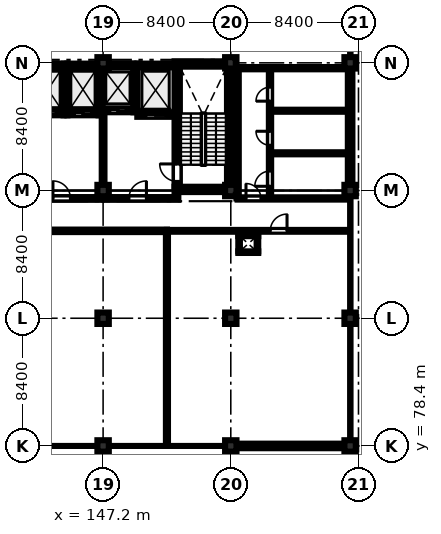
"""IFC4 building model, lengths in metres.
Left out: names, types, materials, properties, quantities, classifications, styles, units other than length and angle.
Written with IfcOpenShell. Run it as: python <this file> out.ifc"""

import sys

from ifc_helpers import new_model, si_unit, direction, frame, frame_2d, origin, origin_2d, place, context, subcontext, project, spatial, rectangle, extrude, element, fill, save


model = new_model("IFC4")
c1 = context("Model", 3, precision=1e-05, world=origin(), true_north=direction((0.0, 1.0)))
c2 = subcontext(c1, "Body", "Model", "MODEL_VIEW")
j1 = project(units=[si_unit("LENGTHUNIT", "METRE"), si_unit("PLANEANGLEUNIT", "RADIAN")], contexts=[c1])
p1 = place(None, origin())
s1 = spatial("IfcSite", under=j1, at=p1, CompositionType="ELEMENT")
p2 = place(p1, origin())
s2 = spatial("IfcBuilding", under=s1, at=p2, CompositionType="ELEMENT")
p3 = place(p2, frame((0.0, 0.0, 40.2)))
s3 = spatial("IfcBuildingStorey", under=s2, at=p3, CompositionType="ELEMENT", Elevation=40.2)
for number, where, z_axis, x_axis in (
    (1, (147.2, 78.4, 0.0), (0.0, 0.0, 1.0), (1.0, 0.0, 0.0)),
    (2, (147.2, 86.8, 0.0), (0.0, 0.0, 1.0), (1.0, 0.0, 0.0)),
    (3, (147.2, 95.2, 0.0), (0.0, 0.0, 1.0), (1.0, 0.0, 0.0)),
    (4, (147.2, 103.6, 0.0), (0.0, 0.0, 1.0), (1.0, 0.0, 0.0)),
    (5, (155.6, 78.4, 0.0), (0.0, 0.0, 1.0), (1.0, 0.0, 0.0)),
    (6, (155.6, 86.8, 0.0), (0.0, 0.0, 1.0), (1.0, 0.0, 0.0)),
    (7, (155.6, 95.2, 0.0), (0.0, 0.0, 1.0), (1.0, 0.0, 0.0)),
    (8, (155.6, 103.6, 0.0), (0.0, 0.0, 1.0), (1.0, 0.0, 0.0)),
    (9, (163.45, 78.4, 0.0), (0.0, 0.0, 1.0), (1.0, 0.0, 0.0)),
    (10, (163.45, 86.8, 0.0), (0.0, 0.0, 1.0), (1.0, 0.0, 0.0)),
    (11, (163.45, 95.2, 0.0), (0.0, 0.0, 1.0), (1.0, 0.0, 0.0)),
    (12, (163.45, 103.6, 0.0), (0.0, 0.0, 1.0), (1.0, 0.0, 0.0)),
):
    element("IfcColumn", number, at=place(p3, frame(where, z_axis=z_axis, x_axis=x_axis)), inside=s3, PredefinedType="COLUMN", context=c2, shape_type="SweptSolid", body=[
        extrude(rectangle(XDim=0.75, YDim=0.75, at=origin_2d()), origin(), (0.0, 0.0, 1.0), 4.0),
    ])
for number, where, z_axis, x_axis in (
    (13, (151.9, 95.275, 0.0), (0.0, 0.0, 1.0), (1.0, 0.0, 0.0)),
    (14, (151.9, 103.525, 0.0), (0.0, 0.0, 1.0), (1.0, 0.0, 0.0)),
):
    element("IfcWall", number, at=place(p3, frame(where, z_axis=z_axis, x_axis=x_axis)), inside=s3, PredefinedType="SHEAR", context=c2, shape_type="SweptSolid", body=[
        extrude(rectangle(XDim=3.8, YDim=0.35, at=frame_2d((1.9, 0.0))), origin(), (0.0, 0.0, 1.0), 4.0),
    ])
p4 = place(p3, frame((152.075, 95.45, 0.0), z_axis=(0.0, 0.0, 1.0), x_axis=(0.0, 1.0, 0.0)))
e15 = element("IfcWall", 15, at=p4, inside=s3, PredefinedType="SHEAR", context=c2, shape_type="SweptSolid", body=[
    extrude(rectangle(XDim=7.9, YDim=0.35, at=frame_2d((3.95, 0.0))), origin(), (0.0, 0.0, 1.0), 4.0),
])
p5 = place(p4, frame((0.35, 0.0, 0.0)))
e16 = element("IfcOpeningElement", 16, at=p5, cuts=e15, PredefinedType="OPENING", context=c2, shape_type="SweptSolid", body=[
    extrude(rectangle(XDim=1.15, YDim=2.15, at=frame_2d((0.575, 1.075))), frame((0.0, 0.185, 0.0), z_axis=(0.0, -1.0, 0.0), x_axis=(1.0, 0.0, 0.0)), (0.0, 0.0, 1.0), 0.37),
])
p6 = place(p3, frame((155.525, 95.45, 0.0), z_axis=(0.0, 0.0, 1.0), x_axis=(0.0, 1.0, 0.0)))
e17 = element("IfcWall", 17, at=p6, inside=s3, PredefinedType="SHEAR", context=c2, shape_type="SweptSolid", body=[
    extrude(rectangle(XDim=7.9, YDim=0.35, at=frame_2d((3.95, 0.0))), origin(), (0.0, 0.0, 1.0), 4.0),
])
p7 = place(p3, frame((142.5, 100.275, 0.0), z_axis=(0.0, 0.0, 1.0), x_axis=(1.0, 0.0, 0.0)))
e18 = element("IfcWall", 18, at=p7, inside=s3, PredefinedType="SHEAR", context=c2, shape_type="SweptSolid", body=[
    extrude(rectangle(XDim=2.1, YDim=0.25, at=frame_2d((1.05, 0.0))), origin(), (0.0, 0.0, 1.0), 4.0),
])
p8 = place(p7, frame((0.5, 0.0, 0.0)))
e19 = element("IfcOpeningElement", 19, at=p8, cuts=e18, PredefinedType="OPENING", context=c2, shape_type="SweptSolid", body=[
    extrude(rectangle(XDim=1.1, YDim=2.15, at=frame_2d((0.55, 1.075))), frame((0.0, 0.135, 0.0), z_axis=(0.0, -1.0, 0.0), x_axis=(1.0, 0.0, 0.0)), (0.0, 0.0, 1.0), 0.27),
])
p9 = place(p3, frame((142.5, 103.425, 0.0), z_axis=(0.0, 0.0, 1.0), x_axis=(1.0, 0.0, 0.0)))
e20 = element("IfcWall", 20, at=p9, inside=s3, PredefinedType="SHEAR", context=c2, shape_type="SweptSolid", body=[
    extrude(rectangle(XDim=2.1, YDim=0.25, at=frame_2d((1.05, 0.0))), origin(), (0.0, 0.0, 1.0), 4.0),
])
p10 = place(p3, frame((144.725, 100.15, 0.0), z_axis=(0.0, 0.0, 1.0), x_axis=(0.0, 1.0, 0.0)))
e21 = element("IfcWall", 21, at=p10, inside=s3, PredefinedType="SHEAR", context=c2, shape_type="SweptSolid", body=[
    extrude(rectangle(XDim=3.4, YDim=0.25, at=frame_2d((1.7, 0.0))), origin(), (0.0, 0.0, 1.0), 4.0),
])
p11 = place(p3, frame((144.85, 100.275, 0.0), z_axis=(0.0, 0.0, 1.0), x_axis=(1.0, 0.0, 0.0)))
e22 = element("IfcWall", 22, at=p11, inside=s3, PredefinedType="SHEAR", context=c2, shape_type="SweptSolid", body=[
    extrude(rectangle(XDim=2.05, YDim=0.25, at=frame_2d((1.025, 0.0))), origin(), (0.0, 0.0, 1.0), 4.0),
])
p12 = place(p11, frame((0.465, 0.0, 0.0)))
e23 = element("IfcOpeningElement", 23, at=p12, cuts=e22, PredefinedType="OPENING", context=c2, shape_type="SweptSolid", body=[
    extrude(rectangle(XDim=1.12, YDim=2.15, at=frame_2d((0.56, 1.075))), frame((0.0, 0.135, 0.0), z_axis=(0.0, -1.0, 0.0), x_axis=(1.0, 0.0, 0.0)), (0.0, 0.0, 1.0), 0.27),
])
p13 = place(p3, frame((144.85, 103.425, 0.0), z_axis=(0.0, 0.0, 1.0), x_axis=(1.0, 0.0, 0.0)))
e24 = element("IfcWall", 24, at=p13, inside=s3, PredefinedType="SHEAR", context=c2, shape_type="SweptSolid", body=[
    extrude(rectangle(XDim=2.05, YDim=0.25, at=frame_2d((1.025, 0.0))), origin(), (0.0, 0.0, 1.0), 4.0),
])
p14 = place(p3, frame((147.025, 100.15, 0.0), z_axis=(0.0, 0.0, 1.0), x_axis=(0.0, 1.0, 0.0)))
e25 = element("IfcWall", 25, at=p14, inside=s3, PredefinedType="SHEAR", context=c2, shape_type="SweptSolid", body=[
    extrude(rectangle(XDim=3.4, YDim=0.25, at=frame_2d((1.7, 0.0))), origin(), (0.0, 0.0, 1.0), 4.0),
])
p15 = place(p3, frame((147.15, 100.475, 0.0), z_axis=(0.0, 0.0, 1.0), x_axis=(1.0, 0.0, 0.0)))
e26 = element("IfcWall", 26, at=p15, inside=s3, PredefinedType="SHEAR", context=c2, shape_type="SweptSolid", body=[
    extrude(rectangle(XDim=2.05, YDim=0.25, at=frame_2d((1.025, 0.0))), origin(), (0.0, 0.0, 1.0), 4.0),
])
p16 = place(p15, frame((0.495, 0.0, 0.0)))
e27 = element("IfcOpeningElement", 27, at=p16, cuts=e26, PredefinedType="OPENING", context=c2, shape_type="SweptSolid", body=[
    extrude(rectangle(XDim=1.06, YDim=2.15, at=frame_2d((0.53, 1.075))), frame((0.0, 0.135, 0.0), z_axis=(0.0, -1.0, 0.0), x_axis=(1.0, 0.0, 0.0)), (0.0, 0.0, 1.0), 0.27),
])
p17 = place(p3, frame((147.15, 103.425, 0.0), z_axis=(0.0, 0.0, 1.0), x_axis=(1.0, 0.0, 0.0)))
e28 = element("IfcWall", 28, at=p17, inside=s3, PredefinedType="SHEAR", context=c2, shape_type="SweptSolid", body=[
    extrude(rectangle(XDim=2.05, YDim=0.25, at=frame_2d((1.025, 0.0))), origin(), (0.0, 0.0, 1.0), 4.0),
])
p18 = place(p3, frame((149.325, 100.35, 0.0), z_axis=(0.0, 0.0, 1.0), x_axis=(0.0, 1.0, 0.0)))
e29 = element("IfcWall", 29, at=p18, inside=s3, PredefinedType="SHEAR", context=c2, shape_type="SweptSolid", body=[
    extrude(rectangle(XDim=3.2, YDim=0.25, at=frame_2d((1.6, 0.0))), origin(), (0.0, 0.0, 1.0), 4.0),
])
p19 = place(p3, frame((149.45, 100.175, 0.0), z_axis=(0.0, 0.0, 1.0), x_axis=(1.0, 0.0, 0.0)))
e30 = element("IfcWall", 30, at=p19, inside=s3, PredefinedType="SHEAR", context=c2, shape_type="SweptSolid", body=[
    extrude(rectangle(XDim=2.45, YDim=0.25, at=frame_2d((1.225, 0.0))), origin(), (0.0, 0.0, 1.0), 4.0),
])
p20 = place(p19, frame((0.575, 0.0, 0.0)))
e31 = element("IfcOpeningElement", 31, at=p20, cuts=e30, PredefinedType="OPENING", context=c2, shape_type="SweptSolid", body=[
    extrude(rectangle(XDim=1.3, YDim=2.25, at=frame_2d((0.65, 1.125))), frame((0.0, 0.135, 0.0), z_axis=(0.0, -1.0, 0.0), x_axis=(1.0, 0.0, 0.0)), (0.0, 0.0, 1.0), 0.27),
])
p21 = place(p3, frame((149.45, 103.425, 0.0), z_axis=(0.0, 0.0, 1.0), x_axis=(1.0, 0.0, 0.0)))
e32 = element("IfcWall", 32, at=p21, inside=s3, PredefinedType="SHEAR", context=c2, shape_type="SweptSolid", body=[
    extrude(rectangle(XDim=2.45, YDim=0.25, at=frame_2d((1.225, 0.0))), origin(), (0.0, 0.0, 1.0), 4.0),
])
p22 = place(p3, frame((163.075, 78.4, 0.0), z_axis=(0.0, 0.0, 1.0), x_axis=(-1.0, 0.0, 0.0)))
e33 = element("IfcWall", 33, at=p22, inside=s3, PredefinedType="STANDARD", context=c2, shape_type="SweptSolid", body=[
    extrude(rectangle(XDim=7.1, YDim=0.3, at=frame_2d((3.55, 0.0))), origin(), (0.0, 0.0, 1.0), 3.3),
])
p23 = place(p22, frame((1.15, 0.0, 0.95)))
e34 = element("IfcOpeningElement", 34, at=p23, cuts=e33, PredefinedType="OPENING", context=c2, shape_type="SweptSolid", body=[
    extrude(rectangle(XDim=2.25, YDim=1.95, at=frame_2d((1.125, 0.975))), frame((0.0, 0.16, 0.0), z_axis=(0.0, -1.0, 0.0), x_axis=(1.0, 0.0, 0.0)), (0.0, 0.0, 1.0), 0.32),
])
p24 = place(p3, frame((163.45, 103.225, 0.0), z_axis=(0.0, 0.0, 1.0), x_axis=(0.0, -1.0, 0.0)))
e35 = element("IfcWall", 35, at=p24, inside=s3, PredefinedType="STANDARD", context=c2, shape_type="SweptSolid", body=[
    extrude(rectangle(XDim=7.65, YDim=0.3, at=frame_2d((3.825, 0.0))), origin(), (0.0, 0.0, 1.0), 3.3),
])
p25 = place(p24, frame((1.15, 0.0, 1.1)))
e36 = element("IfcOpeningElement", 36, at=p25, cuts=e35, PredefinedType="OPENING", context=c2, shape_type="SweptSolid", body=[
    extrude(rectangle(XDim=1.4, YDim=1.4, at=frame_2d((0.7, 0.7))), frame((0.0, 0.16, 0.0), z_axis=(0.0, -1.0, 0.0), x_axis=(1.0, 0.0, 0.0)), (0.0, 0.0, 1.0), 0.32),
])
p26 = place(p3, frame((142.3, 94.68, 0.0), z_axis=(0.0, 0.0, 1.0), x_axis=(1.0, 0.0, 0.0)))
e37 = element("IfcWall", 37, at=p26, inside=s3, PredefinedType="STANDARD", context=c2, shape_type="SweptSolid", body=[
    extrude(rectangle(XDim=4.8, YDim=0.18, at=frame_2d((2.4, 0.0))), origin(), (0.0, 0.0, 1.0), 4.0),
])
p27 = place(p26, frame((1.6, 0.0, 0.0)))
e38 = element("IfcOpeningElement", 38, at=p27, cuts=e37, PredefinedType="OPENING", context=c2, shape_type="SweptSolid", body=[
    extrude(rectangle(XDim=1.15, YDim=2.15, at=frame_2d((0.575, 1.075))), frame((0.0, 0.1, 0.0), z_axis=(0.0, -1.0, 0.0), x_axis=(1.0, 0.0, 0.0)), (0.0, 0.0, 1.0), 0.2),
])
p28 = place(p3, frame((147.3, 94.68, 0.0), z_axis=(0.0, 0.0, 1.0), x_axis=(1.0, 0.0, 0.0)))
e39 = element("IfcWall", 39, at=p28, inside=s3, PredefinedType="STANDARD", context=c2, shape_type="SweptSolid", body=[
    extrude(rectangle(XDim=4.85, YDim=0.18, at=frame_2d((2.425, 0.0))), origin(), (0.0, 0.0, 1.0), 4.0),
])
p29 = place(p28, frame((1.6, 0.0, 0.0)))
e40 = element("IfcOpeningElement", 40, at=p29, cuts=e39, PredefinedType="OPENING", context=c2, shape_type="SweptSolid", body=[
    extrude(rectangle(XDim=1.15, YDim=2.15, at=frame_2d((0.575, 1.075))), frame((0.0, 0.1, 0.0), z_axis=(0.0, -1.0, 0.0), x_axis=(1.0, 0.0, 0.0)), (0.0, 0.0, 1.0), 0.2),
])
p30 = place(p3, frame((147.2, 95.75, 0.0), z_axis=(0.0, 0.0, 1.0), x_axis=(0.0, 1.0, 0.0)))
e41 = element("IfcWall", 41, at=p30, inside=s3, PredefinedType="STANDARD", context=c2, shape_type="SweptSolid", body=[
    extrude(rectangle(XDim=4.5, YDim=0.18, at=frame_2d((2.25, 0.0))), origin(), (0.0, 0.0, 1.0), 3.3),
])
p31 = place(p3, frame((156.05, 94.68, 0.0), z_axis=(0.0, 0.0, 1.0), x_axis=(1.0, 0.0, 0.0)))
e42 = element("IfcWall", 42, at=p31, inside=s3, PredefinedType="PARTITIONING", context=c2, shape_type="SweptSolid", body=[
    extrude(rectangle(XDim=7.15, YDim=0.15, at=frame_2d((3.575, 0.0))), origin(), (0.0, 0.0, 1.0), 4.0),
])
p32 = place(p31, frame((0.55, 0.0, 0.0)))
e43 = element("IfcOpeningElement", 43, at=p32, cuts=e42, PredefinedType="OPENING", context=c2, shape_type="SweptSolid", body=[
    extrude(rectangle(XDim=0.98, YDim=2.12, at=frame_2d((0.49, 1.06))), frame((0.0, 0.085, 0.0), z_axis=(0.0, -1.0, 0.0), x_axis=(1.0, 0.0, 0.0)), (0.0, 0.0, 1.0), 0.17),
])
p33 = place(p3, frame((158.18, 94.68, 0.0), z_axis=(0.0, 0.0, 1.0), x_axis=(0.0, 1.0, 0.0)))
e44 = element("IfcWall", 44, at=p33, inside=s3, PredefinedType="PARTITIONING", context=c2, shape_type="SweptSolid", body=[
    extrude(rectangle(XDim=8.57, YDim=0.15, at=frame_2d((4.285, 0.0))), origin(), (0.0, 0.0, 1.0), 4.0),
])
p34 = place(p33, frame((0.8, 0.0, 0.0)))
e45 = element("IfcOpeningElement", 45, at=p34, cuts=e44, PredefinedType="OPENING", context=c2, shape_type="SweptSolid", body=[
    extrude(rectangle(XDim=1.0, YDim=2.12, at=frame_2d((0.5, 1.06))), frame((0.0, 0.085, 0.0), z_axis=(0.0, -1.0, 0.0), x_axis=(1.0, 0.0, 0.0)), (0.0, 0.0, 1.0), 0.17),
])
p35 = place(p33, frame((3.5, 0.0, 0.0)))
e46 = element("IfcOpeningElement", 46, at=p35, cuts=e44, PredefinedType="OPENING", context=c2, shape_type="SweptSolid", body=[
    extrude(rectangle(XDim=0.92, YDim=2.1, at=frame_2d((0.46, 1.05))), frame((0.0, 0.085, 0.0), z_axis=(0.0, -1.0, 0.0), x_axis=(1.0, 0.0, 0.0)), (0.0, 0.0, 1.0), 0.17),
])
p36 = place(p33, frame((6.4, 0.0, 0.0)))
e47 = element("IfcOpeningElement", 47, at=p36, cuts=e44, PredefinedType="OPENING", context=c2, shape_type="SweptSolid", body=[
    extrude(rectangle(XDim=0.92, YDim=2.1, at=frame_2d((0.46, 1.05))), frame((0.0, 0.085, 0.0), z_axis=(0.0, -1.0, 0.0), x_axis=(1.0, 0.0, 0.0)), (0.0, 0.0, 1.0), 0.17),
])
for number, where, z_axis, x_axis in (
    (48, (158.18, 97.65, 0.0), (0.0, 0.0, 1.0), (1.0, 0.0, 0.0)),
    (49, (158.18, 100.45, 0.0), (0.0, 0.0, 1.0), (1.0, 0.0, 0.0)),
):
    element("IfcWall", number, at=place(p3, frame(where, z_axis=z_axis, x_axis=x_axis)), inside=s3, PredefinedType="PARTITIONING", context=c2, shape_type="SweptSolid", body=[
        extrude(rectangle(XDim=5.02, YDim=0.135, at=frame_2d((2.51, 0.0))), origin(), (0.0, 0.0, 1.0), 4.0),
    ])
p37 = place(p3, frame((156.05, 103.25, 0.0), z_axis=(0.0, 0.0, 1.0), x_axis=(1.0, 0.0, 0.0)))
e50 = element("IfcWall", 50, at=p37, inside=s3, PredefinedType="PARTITIONING", context=c2, shape_type="SweptSolid", body=[
    extrude(rectangle(XDim=7.15, YDim=0.15, at=frame_2d((3.575, 0.0))), origin(), (0.0, 0.0, 1.0), 4.0),
])
p38 = place(p3, frame((156.05, 94.68, 0.0), z_axis=(0.0, 0.0, 1.0), x_axis=(0.0, 1.0, 0.0)))
e51 = element("IfcWall", 51, at=p38, inside=s3, PredefinedType="PARTITIONING", context=c2, shape_type="SweptSolid", body=[
    extrude(rectangle(XDim=8.57, YDim=0.15, at=frame_2d((4.285, 0.0))), origin(), (0.0, 0.0, 1.0), 4.0),
])
p39 = place(p3, frame((138.8, 92.55, 0.0), z_axis=(0.0, 0.0, 1.0), x_axis=(1.0, 0.0, 0.0)))
e52 = element("IfcWall", 52, at=p39, inside=s3, PredefinedType="PARTITIONING", context=c2, shape_type="SweptSolid", body=[
    extrude(rectangle(XDim=12.6, YDim=0.165, at=frame_2d((6.3, 0.0))), origin(), (0.0, 0.0, 1.0), 4.0),
])
p40 = place(p39, frame((3.4, 0.0, 0.0)))
e53 = element("IfcOpeningElement", 53, at=p40, cuts=e52, PredefinedType="OPENING", context=c2, shape_type="SweptSolid", body=[
    extrude(rectangle(XDim=1.02, YDim=2.15, at=frame_2d((0.51, 1.075))), frame((0.0, 0.093, 0.0), z_axis=(0.0, -1.0, 0.0), x_axis=(1.0, 0.0, 0.0)), (0.0, 0.0, 1.0), 0.185),
])
p41 = place(p3, frame((151.4, 92.55, 0.0), z_axis=(0.0, 0.0, 1.0), x_axis=(1.0, 0.0, 0.0)))
e54 = element("IfcWall", 54, at=p41, inside=s3, PredefinedType="PARTITIONING", context=c2, shape_type="SweptSolid", body=[
    extrude(rectangle(XDim=11.95, YDim=0.12, at=frame_2d((5.975, 0.0))), origin(), (0.0, 0.0, 1.0), 4.0),
])
p42 = place(p41, frame((6.8, 0.0, 0.0)))
e55 = element("IfcOpeningElement", 55, at=p42, cuts=e54, PredefinedType="OPENING", context=c2, shape_type="SweptSolid", body=[
    extrude(rectangle(XDim=1.1, YDim=2.18, at=frame_2d((0.55, 1.09))), frame((0.0, 0.07, 0.0), z_axis=(0.0, -1.0, 0.0), x_axis=(1.0, 0.0, 0.0)), (0.0, 0.0, 1.0), 0.14),
])
p43 = place(p3, frame((151.4, 78.55, 0.0), z_axis=(0.0, 0.0, 1.0), x_axis=(0.0, 1.0, 0.0)))
e56 = element("IfcWall", 56, at=p43, inside=s3, PredefinedType="PARTITIONING", context=c2, shape_type="SweptSolid", body=[
    extrude(rectangle(XDim=14.0, YDim=0.135, at=frame_2d((7.0, 0.0))), origin(), (0.0, 0.0, 1.0), 3.55),
])
for number, where, z_axis, x_axis in (
    (57, (156.095, 91.147, 0.0), (0.0, 0.0, 1.0), (1.0, 0.0, 0.0)),
    (58, (156.095, 92.252, 0.0), (0.0, 0.0, 1.0), (1.0, 0.0, 0.0)),
):
    element("IfcWall", number, at=place(p3, frame(where, z_axis=z_axis, x_axis=x_axis)), inside=s3, PredefinedType="PARTITIONING", context=c2, shape_type="SweptSolid", body=[
        extrude(rectangle(XDim=1.31, YDim=0.105, at=frame_2d((0.655, 0.0))), origin(), (0.0, 0.0, 1.0), 4.0),
    ])
for number, where, z_axis, x_axis in (
    (59, (156.147, 91.2, 0.0), (0.0, 0.0, 1.0), (0.0, 1.0, 0.0)),
    (60, (157.353, 91.2, 0.0), (0.0, 0.0, 1.0), (0.0, 1.0, 0.0)),
):
    element("IfcWall", number, at=place(p3, frame(where, z_axis=z_axis, x_axis=x_axis)), inside=s3, PredefinedType="PARTITIONING", context=c2, shape_type="SweptSolid", body=[
        extrude(rectangle(XDim=1.0, YDim=0.105, at=frame_2d((0.5, 0.0))), origin(), (0.0, 0.0, 1.0), 4.0),
    ])
p44 = place(p23, origin())
e61 = element("IfcWindow", 61, at=p44, inside=s3, PartitioningType="TRIPLE_PANEL_VERTICAL", PredefinedType="WINDOW", context=c2, shape_type="SweptSolid", body=[
    extrude(rectangle(XDim=2.25, YDim=1.95, at=frame_2d((1.125, 0.975))), frame((0.0, 0.03, 0.0), z_axis=(0.0, -1.0, 0.0), x_axis=(1.0, 0.0, 0.0)), (0.0, 0.0, 1.0), 0.06),
])
fill(e34, e61)
p45 = place(p25, origin())
e62 = element("IfcWindow", 62, at=p45, inside=s3, PartitioningType="SINGLE_PANEL", PredefinedType="WINDOW", context=c2, shape_type="SweptSolid", body=[
    extrude(rectangle(XDim=1.4, YDim=1.4, at=frame_2d((0.7, 0.7))), frame((0.0, 0.03, 0.0), z_axis=(0.0, -1.0, 0.0), x_axis=(1.0, 0.0, 0.0)), (0.0, 0.0, 1.0), 0.06),
])
fill(e36, e62)
p46 = place(p27, origin())
e63 = element("IfcDoor", 63, at=p46, inside=s3, OperationType="SINGLE_SWING_LEFT", PredefinedType="DOOR", context=c2, shape_type="SweptSolid", body=[
    extrude(rectangle(XDim=1.15, YDim=2.15, at=frame_2d((0.575, 1.075))), frame((0.0, 0.025, 0.0), z_axis=(0.0, -1.0, 0.0), x_axis=(1.0, 0.0, 0.0)), (0.0, 0.0, 1.0), 0.05),
])
fill(e38, e63)
p47 = place(p29, origin())
e64 = element("IfcDoor", 64, at=p47, inside=s3, OperationType="SINGLE_SWING_RIGHT", PredefinedType="DOOR", context=c2, shape_type="SweptSolid", body=[
    extrude(rectangle(XDim=1.15, YDim=2.15, at=frame_2d((0.575, 1.075))), frame((0.0, 0.025, 0.0), z_axis=(0.0, -1.0, 0.0), x_axis=(1.0, 0.0, 0.0)), (0.0, 0.0, 1.0), 0.05),
])
fill(e40, e64)
p48 = place(p32, origin())
e65 = element("IfcDoor", 65, at=p48, inside=s3, OperationType="SINGLE_SWING_LEFT", PredefinedType="DOOR", context=c2, shape_type="SweptSolid", body=[
    extrude(rectangle(XDim=0.98, YDim=2.12, at=frame_2d((0.49, 1.06))), frame((0.0, 0.025, 0.0), z_axis=(0.0, -1.0, 0.0), x_axis=(1.0, 0.0, 0.0)), (0.0, 0.0, 1.0), 0.05),
])
fill(e43, e65)
p49 = place(p34, origin())
e66 = element("IfcDoor", 66, at=p49, inside=s3, OperationType="SINGLE_SWING_LEFT", PredefinedType="DOOR", context=c2, shape_type="SweptSolid", body=[
    extrude(rectangle(XDim=1.0, YDim=2.12, at=frame_2d((0.5, 1.06))), frame((0.0, 0.025, 0.0), z_axis=(0.0, -1.0, 0.0), x_axis=(1.0, 0.0, 0.0)), (0.0, 0.0, 1.0), 0.05),
])
fill(e45, e66)
p50 = place(p35, origin())
e67 = element("IfcDoor", 67, at=p50, inside=s3, OperationType="SINGLE_SWING_RIGHT", PredefinedType="DOOR", context=c2, shape_type="SweptSolid", body=[
    extrude(rectangle(XDim=0.92, YDim=2.1, at=frame_2d((0.46, 1.05))), frame((0.0, 0.025, 0.0), z_axis=(0.0, -1.0, 0.0), x_axis=(1.0, 0.0, 0.0)), (0.0, 0.0, 1.0), 0.05),
])
fill(e46, e67)
p51 = place(p36, origin())
e68 = element("IfcDoor", 68, at=p51, inside=s3, OperationType="SINGLE_SWING_LEFT", PredefinedType="DOOR", context=c2, shape_type="SweptSolid", body=[
    extrude(rectangle(XDim=0.92, YDim=2.1, at=frame_2d((0.46, 1.05))), frame((0.0, 0.025, 0.0), z_axis=(0.0, -1.0, 0.0), x_axis=(1.0, 0.0, 0.0)), (0.0, 0.0, 1.0), 0.05),
])
fill(e47, e68)
p52 = place(p42, origin())
e69 = element("IfcDoor", 69, at=p52, inside=s3, OperationType="SINGLE_SWING_RIGHT", PredefinedType="DOOR", context=c2, shape_type="SweptSolid", body=[
    extrude(rectangle(XDim=1.1, YDim=2.18, at=frame_2d((0.55, 1.09))), frame((0.0, 0.025, 0.0), z_axis=(0.0, -1.0, 0.0), x_axis=(1.0, 0.0, 0.0)), (0.0, 0.0, 1.0), 0.05),
])
fill(e55, e69)
p53 = place(p5, origin())
e70 = element("IfcDoor", 70, at=p53, inside=s3, OperationType="SINGLE_SWING_RIGHT", PredefinedType="DOOR", context=c2, shape_type="SweptSolid", body=[
    extrude(rectangle(XDim=1.15, YDim=2.15, at=frame_2d((0.575, 1.075))), frame((0.0, 0.025, 0.0), z_axis=(0.0, -1.0, 0.0), x_axis=(1.0, 0.0, 0.0)), (0.0, 0.0, 1.0), 0.05),
])
fill(e16, e70)
p54 = place(p8, origin())
e71 = element("IfcDoor", 71, at=p54, inside=s3, OperationType="SLIDING_TO_LEFT", PredefinedType="DOOR", context=c2, shape_type="SweptSolid", body=[
    extrude(rectangle(XDim=1.1, YDim=2.15, at=frame_2d((0.55, 1.075))), frame((0.0, 0.025, 0.0), z_axis=(0.0, -1.0, 0.0), x_axis=(1.0, 0.0, 0.0)), (0.0, 0.0, 1.0), 0.05),
])
fill(e19, e71)
p55 = place(p12, origin())
e72 = element("IfcDoor", 72, at=p55, inside=s3, OperationType="SLIDING_TO_LEFT", PredefinedType="DOOR", context=c2, shape_type="SweptSolid", body=[
    extrude(rectangle(XDim=1.12, YDim=2.15, at=frame_2d((0.56, 1.075))), frame((0.0, 0.025, 0.0), z_axis=(0.0, -1.0, 0.0), x_axis=(1.0, 0.0, 0.0)), (0.0, 0.0, 1.0), 0.05),
])
fill(e23, e72)
p56 = place(p16, origin())
e73 = element("IfcDoor", 73, at=p56, inside=s3, OperationType="SLIDING_TO_LEFT", PredefinedType="DOOR", context=c2, shape_type="SweptSolid", body=[
    extrude(rectangle(XDim=1.06, YDim=2.15, at=frame_2d((0.53, 1.075))), frame((0.0, 0.025, 0.0), z_axis=(0.0, -1.0, 0.0), x_axis=(1.0, 0.0, 0.0)), (0.0, 0.0, 1.0), 0.05),
])
fill(e27, e73)
p57 = place(p20, origin())
e74 = element("IfcDoor", 74, at=p57, inside=s3, OperationType="SLIDING_TO_LEFT", PredefinedType="DOOR", context=c2, shape_type="SweptSolid", body=[
    extrude(rectangle(XDim=1.3, YDim=2.25, at=frame_2d((0.65, 1.125))), frame((0.0, 0.025, 0.0), z_axis=(0.0, -1.0, 0.0), x_axis=(1.0, 0.0, 0.0)), (0.0, 0.0, 1.0), 0.05),
])
fill(e31, e74)
save(model, sys.argv[1])
